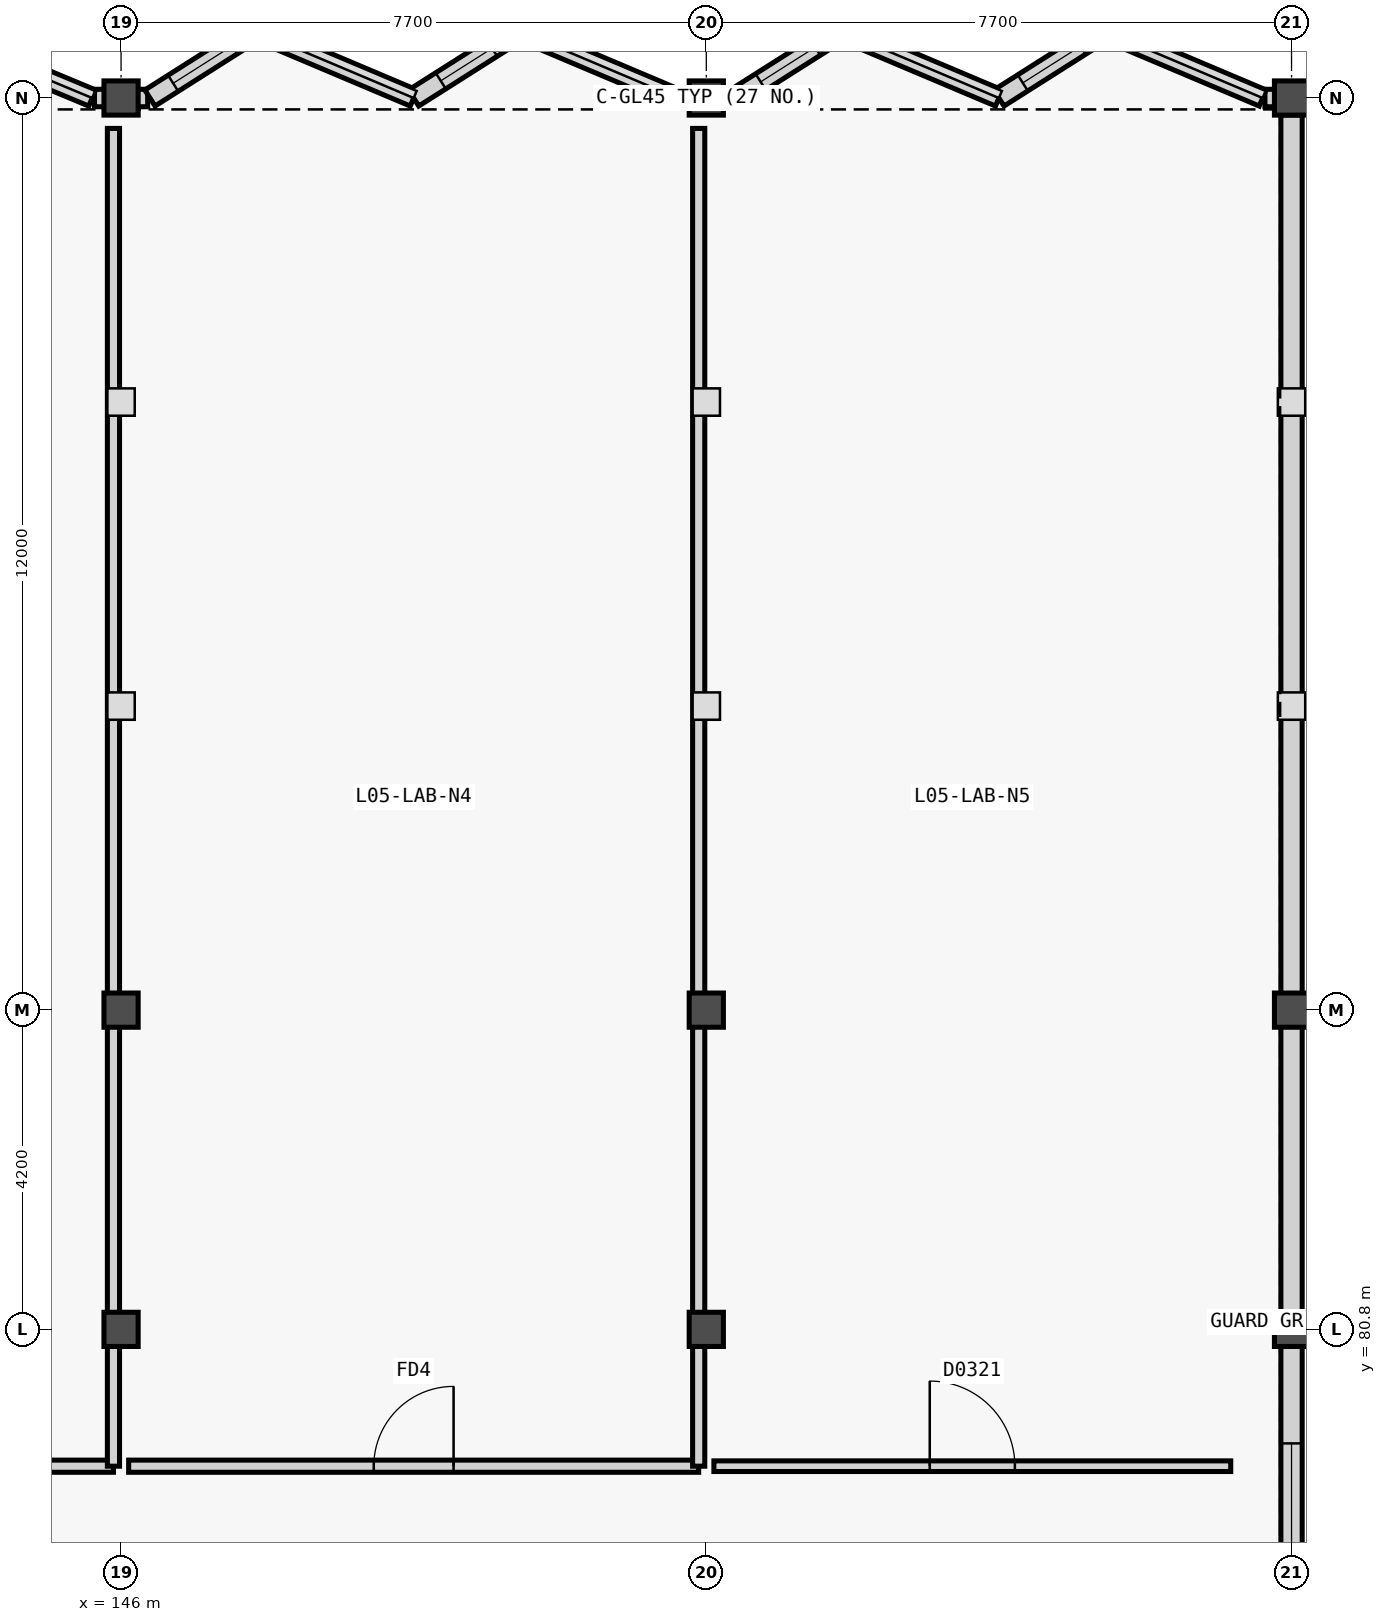
"""IFC4 building model, lengths in metres.
Left out: names, types, materials, properties, quantities, classifications, styles, units other than length and angle.
Written with IfcOpenShell. Run it as: python <this file> out.ifc"""

import sys

from ifc_helpers import new_model, si_unit, direction, frame, frame_2d, origin, origin_2d, place, context, subcontext, project, spatial, rectangle, extrude, element, fill, save


model = new_model("IFC4")
c1 = context("Model", 3, precision=1e-05, world=origin(), true_north=direction((0.0, 1.0)))
c2 = subcontext(c1, "Body", "Model", "MODEL_VIEW")
j1 = project(units=[si_unit("LENGTHUNIT", "METRE"), si_unit("PLANEANGLEUNIT", "RADIAN")], contexts=[c1])
p1 = place(None, origin())
s1 = spatial("IfcSite", under=j1, at=p1, CompositionType="ELEMENT")
p2 = place(p1, origin())
s2 = spatial("IfcBuilding", under=s1, at=p2, CompositionType="ELEMENT")
p3 = place(p2, frame((0.0, 0.0, 21.6)))
s3 = spatial("IfcBuildingStorey", under=s2, at=p3, CompositionType="ELEMENT", Elevation=21.6)
for number, where, z_axis, x_axis in (
    (1, (146.0, 80.8, 0.0), (0.0, 0.0, 1.0), (1.0, 0.0, 0.0)),
    (2, (146.0, 85.0, 0.0), (0.0, 0.0, 1.0), (1.0, 0.0, 0.0)),
):
    element("IfcColumn", number, at=place(p3, frame(where, z_axis=z_axis, x_axis=x_axis)), inside=s3, PredefinedType="COLUMN", context=c2, shape_type="SweptSolid", body=[
        extrude(rectangle(XDim=0.45, YDim=0.45, at=origin_2d()), origin(), (0.0, 0.0, 1.0), 3.6),
    ])
p4 = place(p3, frame((146.0, 97.0, -0.24), z_axis=(0.0, 0.0, 1.0), x_axis=(1.0, 0.0, 0.0)))
e3 = element("IfcColumn", 3, at=p4, inside=s3, PredefinedType="COLUMN", context=c2, shape_type="SweptSolid", body=[
    extrude(rectangle(XDim=0.45, YDim=0.45, at=origin_2d()), origin(), (0.0, 0.0, 1.0), 3.84),
])
for number, where, z_axis, x_axis in (
    (4, (153.7, 80.8, 0.0), (0.0, 0.0, 1.0), (1.0, 0.0, 0.0)),
    (5, (153.7, 85.0, 0.0), (0.0, 0.0, 1.0), (1.0, 0.0, 0.0)),
):
    element("IfcColumn", number, at=place(p3, frame(where, z_axis=z_axis, x_axis=x_axis)), inside=s3, PredefinedType="COLUMN", context=c2, shape_type="SweptSolid", body=[
        extrude(rectangle(XDim=0.45, YDim=0.45, at=origin_2d()), origin(), (0.0, 0.0, 1.0), 3.6),
    ])
p5 = place(p3, frame((153.7, 97.0, -0.24), z_axis=(0.0, 0.0, 1.0), x_axis=(1.0, 0.0, 0.0)))
e6 = element("IfcColumn", 6, at=p5, inside=s3, PredefinedType="COLUMN", context=c2, shape_type="SweptSolid", body=[
    extrude(rectangle(XDim=0.45, YDim=0.45, at=origin_2d()), origin(), (0.0, 0.0, 1.0), 3.84),
])
for number, where, z_axis, x_axis in (
    (7, (161.4, 80.8, 0.0), (0.0, 0.0, 1.0), (1.0, 0.0, 0.0)),
    (8, (161.4, 85.0, 0.0), (0.0, 0.0, 1.0), (1.0, 0.0, 0.0)),
):
    element("IfcColumn", number, at=place(p3, frame(where, z_axis=z_axis, x_axis=x_axis)), inside=s3, PredefinedType="COLUMN", context=c2, shape_type="SweptSolid", body=[
        extrude(rectangle(XDim=0.45, YDim=0.45, at=origin_2d()), origin(), (0.0, 0.0, 1.0), 3.6),
    ])
p6 = place(p3, frame((161.4, 97.0, -0.24), z_axis=(0.0, 0.0, 1.0), x_axis=(1.0, 0.0, 0.0)))
e9 = element("IfcColumn", 9, at=p6, inside=s3, PredefinedType="COLUMN", context=c2, shape_type="SweptSolid", body=[
    extrude(rectangle(XDim=0.45, YDim=0.45, at=origin_2d()), origin(), (0.0, 0.0, 1.0), 3.84),
])
p7 = place(p3, frame((161.4, 96.777, 0.0), z_axis=(0.0, 0.0, 1.0), x_axis=(0.0, -1.0, 0.0)))
e10 = element("IfcWall", 10, at=p7, inside=s3, PredefinedType="SOLIDWALL", context=c2, shape_type="SweptSolid", body=[
    extrude(rectangle(XDim=32.554, YDim=0.28, at=frame_2d((16.277, 0.0))), origin(), (0.0, 0.0, 1.0), 1.98),
])
p8 = place(p7, frame((17.477, 0.0, 0.64)))
e11 = element("IfcOpeningElement", 11, at=p8, cuts=e10, PredefinedType="OPENING", context=c2, shape_type="SweptSolid", body=[
    extrude(rectangle(XDim=5.4, YDim=1.2, at=frame_2d((2.7, 0.6))), frame((0.0, 0.15, 0.0), z_axis=(0.0, -1.0, 0.0), x_axis=(1.0, 0.0, 0.0)), (0.0, 0.0, 1.0), 0.3),
])
for number, where, z_axis, x_axis in (
    (12, (145.65, 97.0, 0.0), (0.0, 0.0, 1.0), (1.0, 0.0, 0.0)),
    (13, (146.0, 97.0, 0.0), (0.0, 0.0, 1.0), (1.0, 0.0, 0.0)),
):
    element("IfcWall", number, at=place(p3, frame(where, z_axis=z_axis, x_axis=x_axis)), inside=s3, PredefinedType="SOLIDWALL", context=c2, shape_type="SweptSolid", body=[
        extrude(rectangle(XDim=0.35, YDim=0.23, at=frame_2d((0.175, 0.0))), origin(), (0.0, 0.0, 1.0), 3.36),
    ])
p9 = place(p3, frame((153.35, 97.0, 0.0), z_axis=(0.0, 0.0, 1.0), x_axis=(1.0, 0.0, 0.0)))
e14 = element("IfcWall", 14, at=p9, inside=s3, PredefinedType="SOLIDWALL", context=c2, shape_type="SweptSolid", body=[
    extrude(rectangle(XDim=0.35, YDim=0.23, at=frame_2d((0.175, 0.0))), origin(), (0.0, 0.0, 1.0), 3.36),
])
p10 = place(p3, frame((153.7, 97.0, 0.0), z_axis=(0.0, 0.0, 1.0), x_axis=(1.0, 0.0, 0.0)))
e15 = element("IfcWall", 15, at=p10, inside=s3, PredefinedType="SOLIDWALL", context=c2, shape_type="SweptSolid", body=[
    extrude(rectangle(XDim=0.35, YDim=0.23, at=frame_2d((0.175, 0.0))), origin(), (0.0, 0.0, 1.0), 3.36),
])
p11 = place(p3, frame((161.05, 97.0, 0.0), z_axis=(0.0, 0.0, 1.0), x_axis=(1.0, 0.0, 0.0)))
e16 = element("IfcWall", 16, at=p11, inside=s3, PredefinedType="SOLIDWALL", context=c2, shape_type="SweptSolid", body=[
    extrude(rectangle(XDim=0.35, YDim=0.23, at=frame_2d((0.175, 0.0))), origin(), (0.0, 0.0, 1.0), 3.36),
])
p12 = place(p3, frame((143.508, 97.88, 0.0), z_axis=(0.0, 0.0, 1.0), x_axis=(0.92309902008, -0.384562347517, 0.0)))
e17 = element("IfcWall", 17, at=p12, inside=s3, PredefinedType="SOLIDWALL", context=c2, shape_type="SweptSolid", body=[
    extrude(rectangle(XDim=2.288, YDim=0.23, at=frame_2d((1.144, 0.0))), origin(), (0.0, 0.0, 1.0), 3.36),
])
p13 = place(p3, frame((146.38, 97.0, 0.0), z_axis=(0.0, 0.0, 1.0), x_axis=(0.844626536799, 0.535355968805, 0.0)))
e18 = element("IfcWall", 18, at=p13, inside=s3, PredefinedType="SOLIDWALL", context=c2, shape_type="SweptSolid", body=[
    extrude(rectangle(XDim=1.644, YDim=0.25, at=frame_2d((0.822, 0.0))), origin(), (0.0, 0.0, 1.0), 3.36),
])
p14 = place(p13, frame((0.362, 0.0, 0.82)))
e19 = element("IfcOpeningElement", 19, at=p14, cuts=e18, PredefinedType="OPENING", context=c2, shape_type="SweptSolid", body=[
    extrude(rectangle(XDim=0.92, YDim=1.38, at=frame_2d((0.46, 0.69))), frame((0.0, 0.135, 0.0), z_axis=(0.0, -1.0, 0.0), x_axis=(1.0, 0.0, 0.0)), (0.0, 0.0, 1.0), 0.27),
])
p15 = place(p3, frame((147.768, 97.88, 0.0), z_axis=(0.0, 0.0, 1.0), x_axis=(0.921122216024, -0.389273506866, 0.0)))
e20 = element("IfcWall", 20, at=p15, inside=s3, PredefinedType="SOLIDWALL", context=c2, shape_type="SweptSolid", body=[
    extrude(rectangle(XDim=2.26, YDim=0.23, at=frame_2d((1.13, 0.0))), origin(), (0.0, 0.0, 1.0), 3.36),
])
p16 = place(p3, frame((149.85, 97.0, 0.0), z_axis=(0.0, 0.0, 1.0), x_axis=(0.844583954912, 0.535423143976, 0.0)))
e21 = element("IfcWall", 21, at=p16, inside=s3, PredefinedType="SOLIDWALL", context=c2, shape_type="SweptSolid", body=[
    extrude(rectangle(XDim=1.643, YDim=0.25, at=frame_2d((0.822, 0.0))), origin(), (0.0, 0.0, 1.0), 3.36),
])
p17 = place(p16, frame((0.422, 0.0, 0.82)))
e22 = element("IfcOpeningElement", 22, at=p17, cuts=e21, PredefinedType="OPENING", context=c2, shape_type="SweptSolid", body=[
    extrude(rectangle(XDim=0.8, YDim=1.35, at=frame_2d((0.4, 0.675))), frame((0.0, 0.135, 0.0), z_axis=(0.0, -1.0, 0.0), x_axis=(1.0, 0.0, 0.0)), (0.0, 0.0, 1.0), 0.27),
])
p18 = place(p3, frame((151.238, 97.88, 0.0), z_axis=(0.0, 0.0, 1.0), x_axis=(0.921122216024, -0.389273506866, 0.0)))
e23 = element("IfcWall", 23, at=p18, inside=s3, PredefinedType="SOLIDWALL", context=c2, shape_type="SweptSolid", body=[
    extrude(rectangle(XDim=2.26, YDim=0.23, at=frame_2d((1.13, 0.0))), origin(), (0.0, 0.0, 1.0), 3.36),
])
p19 = place(p3, frame((154.08, 97.0, 0.0), z_axis=(0.0, 0.0, 1.0), x_axis=(0.844583954912, 0.535423143976, 0.0)))
e24 = element("IfcWall", 24, at=p19, inside=s3, PredefinedType="SOLIDWALL", context=c2, shape_type="SweptSolid", body=[
    extrude(rectangle(XDim=1.643, YDim=0.25, at=frame_2d((0.822, 0.0))), origin(), (0.0, 0.0, 1.0), 3.36),
])
p20 = place(p19, frame((0.397, 0.0, 0.82)))
e25 = element("IfcOpeningElement", 25, at=p20, cuts=e24, PredefinedType="OPENING", context=c2, shape_type="SweptSolid", body=[
    extrude(rectangle(XDim=0.85, YDim=1.4, at=frame_2d((0.425, 0.7))), frame((0.0, 0.135, 0.0), z_axis=(0.0, -1.0, 0.0), x_axis=(1.0, 0.0, 0.0)), (0.0, 0.0, 1.0), 0.27),
])
p21 = place(p3, frame((155.468, 97.88, 0.0), z_axis=(0.0, 0.0, 1.0), x_axis=(0.921122216024, -0.389273506866, 0.0)))
e26 = element("IfcWall", 26, at=p21, inside=s3, PredefinedType="SOLIDWALL", context=c2, shape_type="SweptSolid", body=[
    extrude(rectangle(XDim=2.26, YDim=0.23, at=frame_2d((1.13, 0.0))), origin(), (0.0, 0.0, 1.0), 3.36),
])
p22 = place(p3, frame((157.55, 97.0, 0.0), z_axis=(0.0, 0.0, 1.0), x_axis=(0.844583954912, 0.535423143976, 0.0)))
e27 = element("IfcWall", 27, at=p22, inside=s3, PredefinedType="SOLIDWALL", context=c2, shape_type="SweptSolid", body=[
    extrude(rectangle(XDim=1.643, YDim=0.25, at=frame_2d((0.822, 0.0))), origin(), (0.0, 0.0, 1.0), 3.36),
])
p23 = place(p22, frame((0.372, 0.0, 0.82)))
e28 = element("IfcOpeningElement", 28, at=p23, cuts=e27, PredefinedType="OPENING", context=c2, shape_type="SweptSolid", body=[
    extrude(rectangle(XDim=0.9, YDim=1.45, at=frame_2d((0.45, 0.725))), frame((0.0, 0.135, 0.0), z_axis=(0.0, -1.0, 0.0), x_axis=(1.0, 0.0, 0.0)), (0.0, 0.0, 1.0), 0.27),
])
p24 = place(p3, frame((158.938, 97.88, 0.0), z_axis=(0.0, 0.0, 1.0), x_axis=(0.921122216024, -0.389273506866, 0.0)))
e29 = element("IfcWall", 29, at=p24, inside=s3, PredefinedType="SOLIDWALL", context=c2, shape_type="SweptSolid", body=[
    extrude(rectangle(XDim=2.26, YDim=0.23, at=frame_2d((1.13, 0.0))), origin(), (0.0, 0.0, 1.0), 3.36),
])
p25 = place(p3, frame((138.3, 79.0, 0.0), z_axis=(0.0, 0.0, 1.0), x_axis=(1.0, 0.0, 0.0)))
e30 = element("IfcWall", 30, at=p25, inside=s3, PredefinedType="PARTITIONING", context=c2, shape_type="SweptSolid", body=[
    extrude(rectangle(XDim=7.6, YDim=0.16, at=frame_2d((3.8, 0.0))), origin(), (0.0, 0.0, 1.0), 3.34),
])
p26 = place(p25, frame((3.275, 0.0, 0.0)))
e31 = element("IfcOpeningElement", 31, at=p26, cuts=e30, PredefinedType="OPENING", context=c2, shape_type="SweptSolid", body=[
    extrude(rectangle(XDim=1.05, YDim=2.15, at=frame_2d((0.525, 1.075))), frame((0.0, 0.09, 0.0), z_axis=(0.0, -1.0, 0.0), x_axis=(1.0, 0.0, 0.0)), (0.0, 0.0, 1.0), 0.18),
])
p27 = place(p3, frame((145.9, 79.0, 0.0), z_axis=(0.0, 0.0, 1.0), x_axis=(0.0, 1.0, 0.0)))
e32 = element("IfcWall", 32, at=p27, inside=s3, PredefinedType="PARTITIONING", context=c2, shape_type="SweptSolid", body=[
    extrude(rectangle(XDim=17.6, YDim=0.16, at=frame_2d((8.8, 0.0))), origin(), (0.0, 0.0, 1.0), 1.98),
])
p28 = place(p3, frame((146.1, 79.0, 0.0), z_axis=(0.0, 0.0, 1.0), x_axis=(1.0, 0.0, 0.0)))
e33 = element("IfcWall", 33, at=p28, inside=s3, PredefinedType="PARTITIONING", context=c2, shape_type="SweptSolid", body=[
    extrude(rectangle(XDim=7.5, YDim=0.16, at=frame_2d((3.75, 0.0))), origin(), (0.0, 0.0, 1.0), 3.34),
])
p29 = place(p28, frame((3.225, 0.0, 0.0)))
e34 = element("IfcOpeningElement", 34, at=p29, cuts=e33, PredefinedType="OPENING", context=c2, shape_type="SweptSolid", body=[
    extrude(rectangle(XDim=1.05, YDim=2.15, at=frame_2d((0.525, 1.075))), frame((0.0, 0.09, 0.0), z_axis=(0.0, -1.0, 0.0), x_axis=(1.0, 0.0, 0.0)), (0.0, 0.0, 1.0), 0.18),
])
p30 = place(p3, frame((153.6, 79.0, 0.0), z_axis=(0.0, 0.0, 1.0), x_axis=(0.0, 1.0, 0.0)))
e35 = element("IfcWall", 35, at=p30, inside=s3, PredefinedType="PARTITIONING", context=c2, shape_type="SweptSolid", body=[
    extrude(rectangle(XDim=17.6, YDim=0.16, at=frame_2d((8.8, 0.0))), origin(), (0.0, 0.0, 1.0), 1.98),
])
p31 = place(p3, frame((153.8, 79.0, 0.0), z_axis=(0.0, 0.0, 1.0), x_axis=(1.0, 0.0, 0.0)))
e36 = element("IfcWall", 36, at=p31, inside=s3, PredefinedType="PARTITIONING", context=c2, shape_type="SweptSolid", body=[
    extrude(rectangle(XDim=6.8, YDim=0.14, at=frame_2d((3.4, 0.0))), origin(), (0.0, 0.0, 1.0), 3.34),
])
p32 = place(p31, frame((2.84, 0.0, 0.0)))
e37 = element("IfcOpeningElement", 37, at=p32, cuts=e36, PredefinedType="OPENING", context=c2, shape_type="SweptSolid", body=[
    extrude(rectangle(XDim=1.12, YDim=2.15, at=frame_2d((0.56, 1.075))), frame((0.0, 0.08, 0.0), z_axis=(0.0, -1.0, 0.0), x_axis=(1.0, 0.0, 0.0)), (0.0, 0.0, 1.0), 0.16),
])
p33 = place(p8, origin())
e38 = element("IfcWindow", 38, at=p33, inside=s3, PartitioningType="SINGLE_PANEL", PredefinedType="WINDOW", context=c2, shape_type="SweptSolid", body=[
    extrude(rectangle(XDim=5.4, YDim=1.2, at=frame_2d((2.7, 0.6))), frame((0.0, 0.03, 0.0), z_axis=(0.0, -1.0, 0.0), x_axis=(1.0, 0.0, 0.0)), (0.0, 0.0, 1.0), 0.06),
])
fill(e11, e38)
p34 = place(p14, origin())
e39 = element("IfcWindow", 39, at=p34, inside=s3, PartitioningType="SINGLE_PANEL", PredefinedType="WINDOW", context=c2, shape_type="SweptSolid", body=[
    extrude(rectangle(XDim=0.92, YDim=1.38, at=frame_2d((0.46, 0.69))), frame((0.0, 0.03, 0.0), z_axis=(0.0, -1.0, 0.0), x_axis=(1.0, 0.0, 0.0)), (0.0, 0.0, 1.0), 0.06),
])
fill(e19, e39)
p35 = place(p17, origin())
e40 = element("IfcWindow", 40, at=p35, inside=s3, PartitioningType="SINGLE_PANEL", PredefinedType="WINDOW", context=c2, shape_type="SweptSolid", body=[
    extrude(rectangle(XDim=0.8, YDim=1.35, at=frame_2d((0.4, 0.675))), frame((0.0, 0.03, 0.0), z_axis=(0.0, -1.0, 0.0), x_axis=(1.0, 0.0, 0.0)), (0.0, 0.0, 1.0), 0.06),
])
fill(e22, e40)
p36 = place(p20, origin())
e41 = element("IfcWindow", 41, at=p36, inside=s3, PartitioningType="SINGLE_PANEL", PredefinedType="WINDOW", context=c2, shape_type="SweptSolid", body=[
    extrude(rectangle(XDim=0.85, YDim=1.4, at=frame_2d((0.425, 0.7))), frame((0.0, 0.03, 0.0), z_axis=(0.0, -1.0, 0.0), x_axis=(1.0, 0.0, 0.0)), (0.0, 0.0, 1.0), 0.06),
])
fill(e25, e41)
p37 = place(p23, origin())
e42 = element("IfcWindow", 42, at=p37, inside=s3, PartitioningType="SINGLE_PANEL", PredefinedType="WINDOW", context=c2, shape_type="SweptSolid", body=[
    extrude(rectangle(XDim=0.9, YDim=1.45, at=frame_2d((0.45, 0.725))), frame((0.0, 0.03, 0.0), z_axis=(0.0, -1.0, 0.0), x_axis=(1.0, 0.0, 0.0)), (0.0, 0.0, 1.0), 0.06),
])
fill(e28, e42)
p38 = place(p29, origin())
e43 = element("IfcDoor", 43, at=p38, inside=s3, OperationType="SINGLE_SWING_RIGHT", PredefinedType="DOOR", context=c2, shape_type="SweptSolid", body=[
    extrude(rectangle(XDim=1.05, YDim=2.15, at=frame_2d((0.525, 1.075))), frame((0.0, 0.025, 0.0), z_axis=(0.0, -1.0, 0.0), x_axis=(1.0, 0.0, 0.0)), (0.0, 0.0, 1.0), 0.05),
])
fill(e34, e43)
p39 = place(p32, origin())
e44 = element("IfcDoor", 44, at=p39, inside=s3, OperationType="SINGLE_SWING_LEFT", PredefinedType="DOOR", context=c2, shape_type="SweptSolid", body=[
    extrude(rectangle(XDim=1.12, YDim=2.15, at=frame_2d((0.56, 1.075))), frame((0.0, 0.025, 0.0), z_axis=(0.0, -1.0, 0.0), x_axis=(1.0, 0.0, 0.0)), (0.0, 0.0, 1.0), 0.05),
])
fill(e37, e44)
save(model, sys.argv[1])
